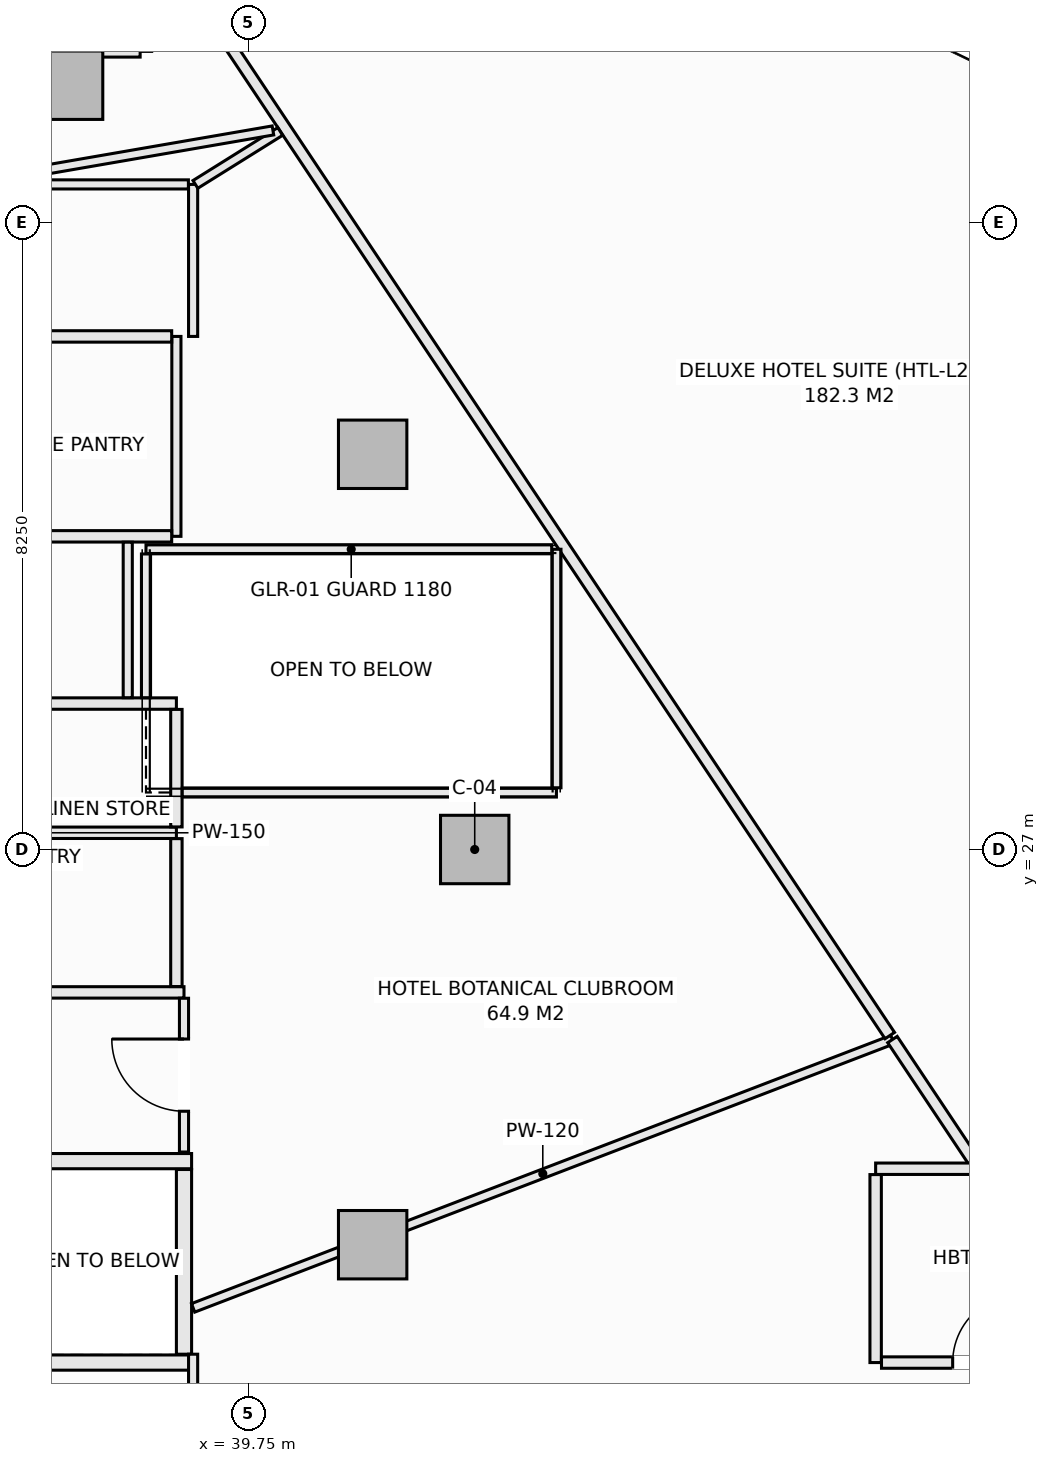
"""IFC4 building model, lengths in metres.
Left out: names, types, materials, properties, quantities, classifications, styles, units other than length and angle.
Written with IfcOpenShell. Run it as: python <this file> out.ifc"""

import sys

from ifc_helpers import new_model, si_unit, direction, frame, frame_2d, origin, origin_2d, place, context, subcontext, project, spatial, rectangle, extrude, element, fill, save


model = new_model("IFC4")
c1 = context("Model", 3, precision=1e-05, world=origin(), true_north=direction((0.0, 1.0)))
c2 = subcontext(c1, "Body", "Model", "MODEL_VIEW")
j1 = project(units=[si_unit("LENGTHUNIT", "METRE"), si_unit("PLANEANGLEUNIT", "RADIAN")], contexts=[c1])
p1 = place(None, origin())
s1 = spatial("IfcSite", under=j1, at=p1, CompositionType="ELEMENT")
p2 = place(p1, origin())
s2 = spatial("IfcBuilding", under=s1, at=p2, CompositionType="ELEMENT")
p3 = place(p2, frame((0.0, 0.0, 108.7)))
s3 = spatial("IfcBuildingStorey", under=s2, at=p3, CompositionType="ELEMENT", Elevation=108.7)
for number, where, z_axis, x_axis in (
    (1, (42.725, 27.0, -0.27), (0.0, 0.0, 1.0), (1.0, 0.0, 0.0)),
    (2, (41.382, 32.199, -0.27), (0.0, 0.0, 1.0), (1.0, 0.0, 0.0)),
    (3, (37.382, 37.055, -0.27), (0.0, 0.0, 1.0), (1.0, 0.0, 0.0)),
    (4, (41.382, 21.801, -0.27), (0.0, 0.0, 1.0), (1.0, 0.0, 0.0)),
):
    element("IfcColumn", number, at=place(p3, frame(where, z_axis=z_axis, x_axis=x_axis)), inside=s3, PredefinedType="COLUMN", context=c2, shape_type="SweptSolid", body=[
        extrude(rectangle(XDim=0.9, YDim=0.9, at=origin_2d()), origin(), (0.0, 0.0, 1.0), 3.4),
    ])
p4 = place(p3, frame((45.769, 39.223, 0.0), z_axis=(0.0, 0.0, 1.0), x_axis=(0.901370184739, -0.433049408339, 0.0)))
e5 = element("IfcWall", 5, at=p4, inside=s3, PredefinedType="SOLIDWALL", context=c2, shape_type="SweptSolid", body=[
    extrude(rectangle(XDim=5.884, YDim=0.3, at=frame_2d((2.942, 0.0))), origin(), (0.0, 0.0, 1.0), 2.653),
])
p5 = place(p4, frame((1.892, 0.0, 0.74)))
e6 = element("IfcOpeningElement", 6, at=p5, cuts=e5, PredefinedType="OPENING", context=c2, shape_type="SweptSolid", body=[
    extrude(rectangle(XDim=2.1, YDim=1.7, at=frame_2d((1.05, 0.85))), frame((0.0, 0.16, 0.0), z_axis=(0.0, -1.0, 0.0), x_axis=(1.0, 0.0, 0.0)), (0.0, 0.0, 1.0), 0.32),
])
for number, where, z_axis, x_axis in (
    (7, (36.75, 22.9, 0.0), (0.0, 0.0, 1.0), (1.0, 0.0, 0.0)),
    (8, (36.75, 20.25, 0.0), (0.0, 0.0, 1.0), (1.0, 0.0, 0.0)),
):
    element("IfcWall", number, at=place(p3, frame(where, z_axis=z_axis, x_axis=x_axis)), inside=s3, PredefinedType="SOLIDWALL", context=c2, shape_type="SweptSolid", body=[
        extrude(rectangle(XDim=2.25, YDim=0.2, at=frame_2d((1.125, 0.0))), origin(), (0.0, 0.0, 1.0), 3.13),
    ])
p6 = place(p3, frame((38.9, 20.36, 0.0), z_axis=(0.0, 0.0, 1.0), x_axis=(0.0, 1.0, 0.0)))
e9 = element("IfcWall", 9, at=p6, inside=s3, PredefinedType="SOLIDWALL", context=c2, shape_type="SweptSolid", body=[
    extrude(rectangle(XDim=2.43, YDim=0.2, at=frame_2d((1.215, 0.0))), origin(), (0.0, 0.0, 1.0), 3.13),
])
p7 = place(p3, frame((30.077, 28.92, 0.0), z_axis=(0.0, 0.0, 1.0), x_axis=(1.0, 0.0, 0.0)))
e10 = element("IfcWall", 10, at=p7, inside=s3, PredefinedType="PARTITIONING", context=c2, shape_type="SweptSolid", body=[
    extrude(rectangle(XDim=8.723, YDim=0.15, at=frame_2d((4.362, 0.0))), origin(), (0.0, 0.0, 1.0), 3.13),
])
p8 = place(p7, frame((1.342, 0.0, 0.0)))
e11 = element("IfcOpeningElement", 11, at=p8, cuts=e10, PredefinedType="OPENING", context=c2, shape_type="SweptSolid", body=[
    extrude(rectangle(XDim=0.95, YDim=2.1, at=frame_2d((0.475, 1.05))), frame((0.0, 0.085, 0.0), z_axis=(0.0, -1.0, 0.0), x_axis=(1.0, 0.0, 0.0)), (0.0, 0.0, 1.0), 0.17),
])
p9 = place(p7, frame((5.178, 0.0, 0.0)))
e12 = element("IfcOpeningElement", 12, at=p9, cuts=e10, PredefinedType="OPENING", context=c2, shape_type="SweptSolid", body=[
    extrude(rectangle(XDim=0.95, YDim=2.1, at=frame_2d((0.475, 1.05))), frame((0.0, 0.085, 0.0), z_axis=(0.0, -1.0, 0.0), x_axis=(1.0, 0.0, 0.0)), (0.0, 0.0, 1.0), 0.17),
])
p10 = place(p3, frame((33.377, 25.12, 0.0), z_axis=(0.0, 0.0, 1.0), x_axis=(1.0, 0.0, 0.0)))
e13 = element("IfcWall", 13, at=p10, inside=s3, PredefinedType="PARTITIONING", context=c2, shape_type="SweptSolid", body=[
    extrude(rectangle(XDim=5.523, YDim=0.15, at=frame_2d((2.761, 0.0))), origin(), (0.0, 0.0, 1.0), 3.13),
])
p11 = place(p10, frame((2.287, 0.0, 0.0)))
e14 = element("IfcOpeningElement", 14, at=p11, cuts=e13, PredefinedType="OPENING", context=c2, shape_type="SweptSolid", body=[
    extrude(rectangle(XDim=0.95, YDim=2.1, at=frame_2d((0.475, 1.05))), frame((0.0, 0.085, 0.0), z_axis=(0.0, -1.0, 0.0), x_axis=(1.0, 0.0, 0.0)), (0.0, 0.0, 1.0), 0.17),
])
p12 = place(p3, frame((33.377, 27.22, 0.0), z_axis=(0.0, 0.0, 1.0), x_axis=(1.0, 0.0, 0.0)))
e15 = element("IfcWall", 15, at=p12, inside=s3, PredefinedType="PARTITIONING", context=c2, shape_type="SweptSolid", body=[
    extrude(rectangle(XDim=5.423, YDim=0.15, at=frame_2d((2.711, 0.0))), origin(), (0.0, 0.0, 1.0), 3.13),
])
p13 = place(p3, frame((38.8, 25.197, 0.0), z_axis=(0.0, 0.0, 1.0), x_axis=(0.0, 1.0, 0.0)))
e16 = element("IfcWall", 16, at=p13, inside=s3, PredefinedType="PARTITIONING", context=c2, shape_type="SweptSolid", body=[
    extrude(rectangle(XDim=1.946, YDim=0.15, at=frame_2d((0.973, 0.0))), origin(), (0.0, 0.0, 1.0), 3.13),
])
p14 = place(p3, frame((38.8, 27.297, 0.0), z_axis=(0.0, 0.0, 1.0), x_axis=(0.0, 1.0, 0.0)))
e17 = element("IfcWall", 17, at=p14, inside=s3, PredefinedType="PARTITIONING", context=c2, shape_type="SweptSolid", body=[
    extrude(rectangle(XDim=1.546, YDim=0.15, at=frame_2d((0.773, 0.0))), origin(), (0.0, 0.0, 1.0), 3.13),
])
p15 = place(p3, frame((38.8, 31.12, 0.0), z_axis=(0.0, 0.0, 1.0), x_axis=(0.0, 1.0, 0.0)))
e18 = element("IfcWall", 18, at=p15, inside=s3, PredefinedType="PARTITIONING", context=c2, shape_type="SweptSolid", body=[
    extrude(rectangle(XDim=2.63, YDim=0.12, at=frame_2d((1.315, 0.0))), origin(), (0.0, 0.0, 1.0), 3.13),
])
p16 = place(p3, frame((30.077, 31.12, 0.0), z_axis=(0.0, 0.0, 1.0), x_axis=(1.0, 0.0, 0.0)))
e19 = element("IfcWall", 19, at=p16, inside=s3, PredefinedType="PARTITIONING", context=c2, shape_type="SweptSolid", body=[
    extrude(rectangle(XDim=8.661, YDim=0.15, at=frame_2d((4.331, 0.0))), origin(), (0.0, 0.0, 1.0), 3.13),
])
p17 = place(p16, frame((1.892, 0.0, 0.0)))
e20 = element("IfcOpeningElement", 20, at=p17, cuts=e19, PredefinedType="OPENING", context=c2, shape_type="SweptSolid", body=[
    extrude(rectangle(XDim=0.95, YDim=2.1, at=frame_2d((0.475, 1.05))), frame((0.0, 0.085, 0.0), z_axis=(0.0, -1.0, 0.0), x_axis=(1.0, 0.0, 0.0)), (0.0, 0.0, 1.0), 0.17),
])
p18 = place(p3, frame((30.077, 33.75, 0.0), z_axis=(0.0, 0.0, 1.0), x_axis=(1.0, 0.0, 0.0)))
e21 = element("IfcWall", 21, at=p18, inside=s3, PredefinedType="PARTITIONING", context=c2, shape_type="SweptSolid", body=[
    extrude(rectangle(XDim=8.661, YDim=0.15, at=frame_2d((4.331, 0.0))), origin(), (0.0, 0.0, 1.0), 3.13),
])
p19 = place(p18, frame((5.812, 0.0, 0.0)))
e22 = element("IfcOpeningElement", 22, at=p19, cuts=e21, PredefinedType="OPENING", context=c2, shape_type="SweptSolid", body=[
    extrude(rectangle(XDim=0.95, YDim=2.1, at=frame_2d((0.475, 1.05))), frame((0.0, 0.085, 0.0), z_axis=(0.0, -1.0, 0.0), x_axis=(1.0, 0.0, 0.0)), (0.0, 0.0, 1.0), 0.17),
])
p20 = place(p3, frame((39.02, 19.44, 0.0), z_axis=(0.0, 0.0, 1.0), x_axis=(0.0, 1.0, 0.0)))
e23 = element("IfcWall", 23, at=p20, inside=s3, PredefinedType="PARTITIONING", context=c2, shape_type="SweptSolid", body=[
    extrude(rectangle(XDim=0.92, YDim=0.12, at=frame_2d((0.46, 0.0))), origin(), (0.0, 0.0, 1.0), 3.13),
])
p21 = place(p3, frame((39.02, 33.75, 0.0), z_axis=(0.0, 0.0, 1.0), x_axis=(0.0, 1.0, 0.0)))
e24 = element("IfcWall", 24, at=p21, inside=s3, PredefinedType="PARTITIONING", context=c2, shape_type="SweptSolid", body=[
    extrude(rectangle(XDim=2.0, YDim=0.12, at=frame_2d((1.0, 0.0))), origin(), (0.0, 0.0, 1.0), 3.13),
])
p22 = place(p3, frame((34.08, 35.75, 0.0), z_axis=(0.0, 0.0, 1.0), x_axis=(1.0, 0.0, 0.0)))
e25 = element("IfcWall", 25, at=p22, inside=s3, PredefinedType="PARTITIONING", context=c2, shape_type="SweptSolid", body=[
    extrude(rectangle(XDim=4.878, YDim=0.12, at=frame_2d((2.439, 0.0))), origin(), (0.0, 0.0, 1.0), 2.505),
])
p23 = place(p3, frame((38.16, 28.997, 0.0), z_axis=(0.0, 0.0, 1.0), x_axis=(0.0, 1.0, 0.0)))
e26 = element("IfcWall", 26, at=p23, inside=s3, PredefinedType="PARTITIONING", context=c2, shape_type="SweptSolid", body=[
    extrude(rectangle(XDim=2.046, YDim=0.12, at=frame_2d((1.023, 0.0))), origin(), (0.0, 0.0, 1.0), 3.13),
])
p24 = place(p3, frame((38.9, 23.02, 0.0), z_axis=(0.0, 0.0, 1.0), x_axis=(0.0, 1.0, 0.0)))
e27 = element("IfcWall", 27, at=p24, inside=s3, PredefinedType="PARTITIONING", context=c2, shape_type="SweptSolid", body=[
    extrude(rectangle(XDim=2.023, YDim=0.12, at=frame_2d((1.011, 0.0))), origin(), (0.0, 0.0, 1.0), 3.13),
])
p25 = place(p24, frame((0.537, 0.0, 0.0)))
e28 = element("IfcOpeningElement", 28, at=p25, cuts=e27, PredefinedType="OPENING", context=c2, shape_type="SweptSolid", body=[
    extrude(rectangle(XDim=0.95, YDim=2.1, at=frame_2d((0.475, 1.05))), frame((0.0, 0.07, 0.0), z_axis=(0.0, -1.0, 0.0), x_axis=(1.0, 0.0, 0.0)), (0.0, 0.0, 1.0), 0.14),
])
p26 = place(p3, frame((39.02, 20.97, 0.0), z_axis=(0.0, 0.0, 1.0), x_axis=(0.933683590648, 0.358099082035, 0.0)))
e29 = element("IfcWall", 29, at=p26, inside=s3, PredefinedType="PARTITIONING", context=c2, shape_type="SweptSolid", body=[
    extrude(rectangle(XDim=9.855, YDim=0.12, at=frame_2d((4.927, 0.0))), origin(), (0.0, 0.0, 1.0), 2.812),
])
p27 = place(p3, frame((37.565, 40.488, 0.0), z_axis=(0.0, 0.0, 1.0), x_axis=(0.554585457046, -0.832126775698, 0.0)))
e30 = element("IfcWall", 30, at=p27, inside=s3, PredefinedType="PARTITIONING", context=c2, shape_type="SweptSolid", body=[
    extrude(rectangle(XDim=19.151, YDim=0.15, at=frame_2d((9.575, 0.0))), origin(), (0.0, 0.0, 1.0), 3.13),
])
p28 = place(p3, frame((48.221, 24.5, 0.0), z_axis=(0.0, 0.0, 1.0), x_axis=(0.554587324832, -0.832125530876, 0.0)))
e31 = element("IfcWall", 31, at=p28, inside=s3, PredefinedType="PARTITIONING", context=c2, shape_type="SweptSolid", body=[
    extrude(rectangle(XDim=6.489, YDim=0.15, at=frame_2d((3.245, 0.0))), origin(), (0.0, 0.0, 1.0), 3.13),
])
p29 = place(p3, frame((48.0, 22.8, 0.0), z_axis=(0.0, 0.0, 1.0), x_axis=(1.0, 0.0, 0.0)))
e32 = element("IfcWall", 32, at=p29, inside=s3, PredefinedType="PARTITIONING", context=c2, shape_type="SweptSolid", body=[
    extrude(rectangle(XDim=1.261, YDim=0.15, at=frame_2d((0.631, 0.0))), origin(), (0.0, 0.0, 1.0), 2.812),
])
p30 = place(p3, frame((48.0, 20.25, 0.0), z_axis=(0.0, 0.0, 1.0), x_axis=(0.0, 1.0, 0.0)))
e33 = element("IfcWall", 33, at=p30, inside=s3, PredefinedType="PARTITIONING", context=c2, shape_type="SweptSolid", body=[
    extrude(rectangle(XDim=2.473, YDim=0.15, at=frame_2d((1.236, 0.0))), origin(), (0.0, 0.0, 1.0), 3.13),
])
p31 = place(p3, frame((48.077, 20.25, 0.0), z_axis=(0.0, 0.0, 1.0), x_axis=(1.0, 0.0, 0.0)))
e34 = element("IfcWall", 34, at=p31, inside=s3, PredefinedType="PARTITIONING", context=c2, shape_type="SweptSolid", body=[
    extrude(rectangle(XDim=2.773, YDim=0.15, at=frame_2d((1.387, 0.0))), origin(), (0.0, 0.0, 1.0), 3.13),
])
p32 = place(p31, frame((0.937, 0.0, 0.0)))
e35 = element("IfcOpeningElement", 35, at=p32, cuts=e34, PredefinedType="OPENING", context=c2, shape_type="SweptSolid", body=[
    extrude(rectangle(XDim=0.9, YDim=2.1, at=frame_2d((0.45, 1.05))), frame((0.0, 0.085, 0.0), z_axis=(0.0, -1.0, 0.0), x_axis=(1.0, 0.0, 0.0)), (0.0, 0.0, 1.0), 0.17),
])
p33 = place(p3, frame((38.877, 27.75, 0.0), z_axis=(0.0, 0.0, 1.0), x_axis=(1.0, 0.0, 0.0)))
e36 = element("IfcWall", 36, at=p33, inside=s3, PredefinedType="PARTITIONING", context=c2, shape_type="SweptSolid", body=[
    extrude(rectangle(XDim=4.923, YDim=0.12, at=frame_2d((2.461, 0.0))), origin(), (0.0, 0.0, 1.0), 3.13),
])
p34 = place(p3, frame((43.8, 27.812, 0.0), z_axis=(0.0, 0.0, 1.0), x_axis=(0.0, 1.0, 0.0)))
e37 = element("IfcWall", 37, at=p34, inside=s3, PredefinedType="PARTITIONING", context=c2, shape_type="SweptSolid", body=[
    extrude(rectangle(XDim=3.138, YDim=0.12, at=frame_2d((1.569, 0.0))), origin(), (0.0, 0.0, 1.0), 3.13),
])
p35 = place(p3, frame((38.4, 30.95, 0.0), z_axis=(0.0, 0.0, 1.0), x_axis=(1.0, 0.0, 0.0)))
e38 = element("IfcWall", 38, at=p35, inside=s3, PredefinedType="PARTITIONING", context=c2, shape_type="SweptSolid", body=[
    extrude(rectangle(XDim=5.338, YDim=0.12, at=frame_2d((2.669, 0.0))), origin(), (0.0, 0.0, 1.0), 3.13),
])
p36 = place(p3, frame((38.4, 28.997, 0.0), z_axis=(0.0, 0.0, 1.0), x_axis=(0.0, 1.0, 0.0)))
e39 = element("IfcWall", 39, at=p36, inside=s3, PredefinedType="PARTITIONING", context=c2, shape_type="SweptSolid", body=[
    extrude(rectangle(XDim=1.891, YDim=0.12, at=frame_2d((0.945, 0.0))), origin(), (0.0, 0.0, 1.0), 3.13),
])
p37 = place(p3, frame((39.05, 35.75, 0.0), z_axis=(0.0, 0.0, 1.0), x_axis=(0.848206690128, 0.529665376272, 0.0)))
e40 = element("IfcWall", 40, at=p37, inside=s3, PredefinedType="PARTITIONING", context=c2, shape_type="SweptSolid", body=[
    extrude(rectangle(XDim=1.316, YDim=0.12, at=frame_2d((0.658, 0.0))), origin(), (0.0, 0.0, 1.0), 3.13),
])
p38 = place(p3, frame((36.077, 37.5, 0.0), z_axis=(0.0, 0.0, 1.0), x_axis=(1.0, 0.0, 0.0)))
e41 = element("IfcWall", 41, at=p38, inside=s3, PredefinedType="PARTITIONING", context=c2, shape_type="SweptSolid", body=[
    extrude(rectangle(XDim=2.246, YDim=0.15, at=frame_2d((1.123, 0.0))), origin(), (0.0, 0.0, 1.0), 2.505),
])
p39 = place(p3, frame((36.664, 35.872, 0.0), z_axis=(0.0, 0.0, 1.0), x_axis=(0.985420944478, 0.170133953648, 0.0)))
e42 = element("IfcWall", 42, at=p39, inside=s3, PredefinedType="PARTITIONING", context=c2, shape_type="SweptSolid", body=[
    extrude(rectangle(XDim=3.457, YDim=0.12, at=frame_2d((1.729, 0.0))), origin(), (0.0, 0.0, 1.0), 3.13),
])
p40 = place(p5, origin())
e43 = element("IfcWindow", 43, at=p40, inside=s3, PartitioningType="SINGLE_PANEL", PredefinedType="WINDOW", context=c2, shape_type="SweptSolid", body=[
    extrude(rectangle(XDim=2.1, YDim=1.7, at=frame_2d((1.05, 0.85))), frame((0.0, 0.03, 0.0), z_axis=(0.0, -1.0, 0.0), x_axis=(1.0, 0.0, 0.0)), (0.0, 0.0, 1.0), 0.06),
])
fill(e6, e43)
p41 = place(p25, origin())
e44 = element("IfcDoor", 44, at=p41, inside=s3, OperationType="SINGLE_SWING_RIGHT", PredefinedType="DOOR", context=c2, shape_type="SweptSolid", body=[
    extrude(rectangle(XDim=0.95, YDim=2.1, at=frame_2d((0.475, 1.05))), frame((0.0, 0.025, 0.0), z_axis=(0.0, -1.0, 0.0), x_axis=(1.0, 0.0, 0.0)), (0.0, 0.0, 1.0), 0.05),
])
fill(e28, e44)
p42 = place(p32, origin())
e45 = element("IfcDoor", 45, at=p42, inside=s3, OperationType="SINGLE_SWING_RIGHT", PredefinedType="DOOR", context=c2, shape_type="SweptSolid", body=[
    extrude(rectangle(XDim=0.9, YDim=2.1, at=frame_2d((0.45, 1.05))), frame((0.0, 0.025, 0.0), z_axis=(0.0, -1.0, 0.0), x_axis=(1.0, 0.0, 0.0)), (0.0, 0.0, 1.0), 0.05),
])
fill(e35, e45)
save(model, sys.argv[1])
